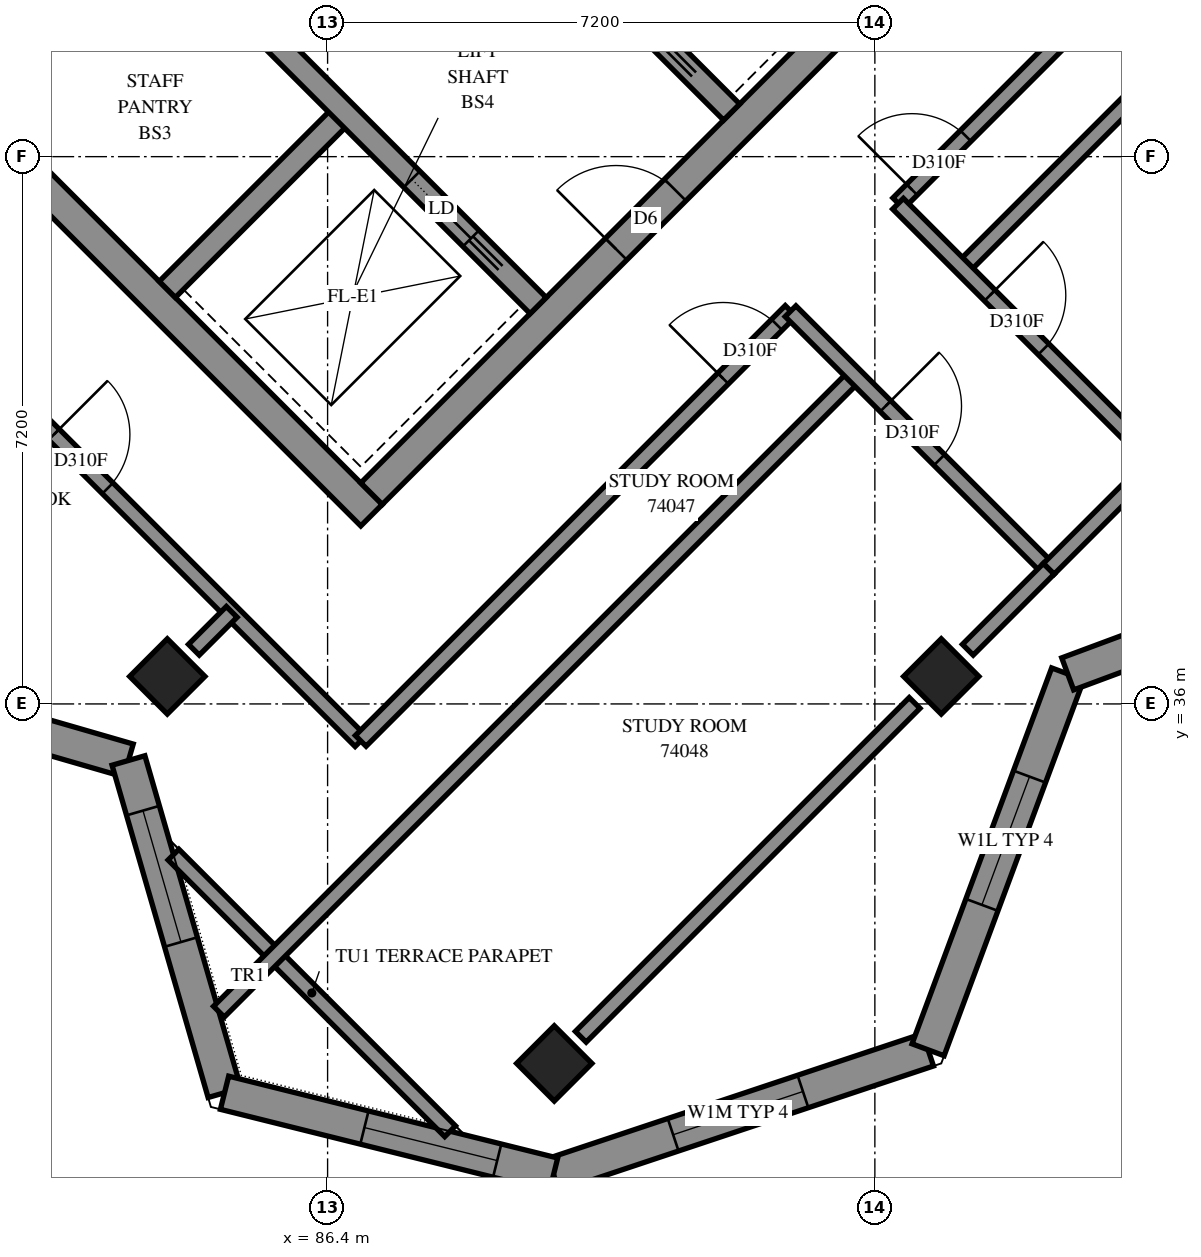
"""IFC4 building model, lengths in metres.
Left out: names, types, materials, properties, quantities, classifications, styles, units other than length and angle.
Written with IfcOpenShell. Run it as: python <this file> out.ifc"""

import sys

from ifc_helpers import new_model, si_unit, direction, frame, frame_2d, origin, origin_2d, place, context, subcontext, project, spatial, polyline, rectangle, outline, extrude, element, fill, save


model = new_model("IFC4")
c1 = context("Model", 3, precision=1e-05, world=origin(), true_north=direction((0.0, 1.0)))
c2 = subcontext(c1, "Body", "Model", "MODEL_VIEW")
j1 = project(units=[si_unit("LENGTHUNIT", "METRE"), si_unit("PLANEANGLEUNIT", "RADIAN")], contexts=[c1])
p1 = place(None, origin())
s1 = spatial("IfcSite", under=j1, at=p1, CompositionType="ELEMENT")
p2 = place(p1, origin())
s2 = spatial("IfcBuilding", under=s1, at=p2, CompositionType="ELEMENT")
p3 = place(p2, frame((0.0, 0.0, 271.0)))
s3 = spatial("IfcBuildingStorey", under=s2, at=p3, CompositionType="ELEMENT", Elevation=271.0)
for number, where, z_axis, x_axis in (
    (1, (84.291, 36.362, 0.0), (0.0, 0.0, 1.0), (0.707, -0.707, 0.0)),
    (2, (94.474, 36.362, 0.0), (0.0, 0.0, 1.0), (0.707, -0.707, 0.0)),
    (3, (89.382, 31.271, 0.0), (0.0, 0.0, 1.0), (0.707, -0.707, 0.0)),
):
    element("IfcColumn", number, at=place(p3, frame(where, z_axis=z_axis, x_axis=x_axis)), inside=s3, PredefinedType="COLUMN", context=c2, shape_type="SweptSolid", body=[
        extrude(rectangle(XDim=0.7, YDim=0.7, at=origin_2d()), origin(), (0.0, 0.0, 1.0), 3.1),
    ])
p4 = place(p3, frame((76.23, 49.231, -0.3), z_axis=(0.0, 0.0, 1.0), x_axis=(0.7071034917, -0.7071100706, 0.0)))
e4 = element("IfcWall", 4, at=p4, inside=s3, PredefinedType="SHEAR", context=c2, shape_type="SweptSolid", body=[
    extrude(rectangle(XDim=15.2, YDim=0.4, at=frame_2d((7.6, 0.0))), origin(), (0.0, 0.0, 1.0), 2.7),
])
p5 = place(p3, frame((86.978, 38.766, -0.3), z_axis=(0.0, 0.0, 1.0), x_axis=(0.7071067812, 0.7071067812, 0.0)))
e5 = element("IfcWall", 5, at=p5, inside=s3, PredefinedType="SHEAR", context=c2, shape_type="SweptSolid", body=[
    extrude(rectangle(XDim=14.4, YDim=0.4, at=frame_2d((7.2, 0.0))), origin(), (0.0, 0.0, 1.0), 2.7),
])
p6 = place(p5, frame((4.55, 0.0, 0.3)))
e6 = element("IfcOpeningElement", 6, at=p6, cuts=e5, PredefinedType="OPENING", context=c2, shape_type="SweptSolid", body=[
    extrude(rectangle(XDim=1.1, YDim=2.1, at=frame_2d((0.55, 1.05))), frame((0.0, 0.21, 0.0), z_axis=(0.0, -1.0, 0.0), x_axis=(1.0, 0.0, 0.0)), (0.0, 0.0, 1.0), 0.42),
])
p7 = place(p5, frame((11.35, 0.0, 0.3)))
e7 = element("IfcOpeningElement", 7, at=p7, cuts=e5, PredefinedType="OPENING", context=c2, shape_type="SweptSolid", body=[
    extrude(rectangle(XDim=1.1, YDim=2.1, at=frame_2d((0.55, 1.05))), frame((0.0, 0.21, 0.0), z_axis=(0.0, -1.0, 0.0), x_axis=(1.0, 0.0, 0.0)), (0.0, 0.0, 1.0), 0.42),
])
for number, where, z_axis, x_axis in (
    (8, (81.746, 43.999, 0.0), (0.0, 0.0, 1.0), (0.707, 0.707, 0.0)),
    (9, (84.291, 41.453, 0.0), (0.0, 0.0, 1.0), (0.707, 0.707, 0.0)),
):
    element("IfcWall", number, at=place(p3, frame(where, z_axis=z_axis, x_axis=x_axis)), inside=s3, PredefinedType="SOLIDWALL", context=c2, shape_type="SweptSolid", body=[
        extrude(rectangle(XDim=3.3, YDim=0.3, at=frame_2d((1.65, 0.0))), origin(), (0.0, 0.0, 1.0), 3.1),
    ])
p8 = place(p3, frame((78.988, 51.423, 0.0), z_axis=(0.0, 0.0, 1.0), x_axis=(0.7071067812, -0.7071067812, 0.0)))
e10 = element("IfcWall", 10, at=p8, inside=s3, PredefinedType="SOLIDWALL", context=c2, shape_type="SweptSolid", body=[
    extrude(rectangle(XDim=14.4, YDim=0.3, at=frame_2d((7.2, 0.0))), origin(), (0.0, 0.0, 1.0), 3.1),
])
p9 = place(p8, frame((1.35, 0.0, 0.0)))
e11 = element("IfcOpeningElement", 11, at=p9, cuts=e10, PredefinedType="OPENING", context=c2, shape_type="SweptSolid", body=[
    extrude(rectangle(XDim=0.9, YDim=2.1, at=frame_2d((0.45, 1.05))), frame((0.0, 0.16, 0.0), z_axis=(0.0, -1.0, 0.0), x_axis=(1.0, 0.0, 0.0)), (0.0, 0.0, 1.0), 0.32),
])
p10 = place(p8, frame((4.95, 0.0, 0.0)))
e12 = element("IfcOpeningElement", 12, at=p10, cuts=e10, PredefinedType="OPENING", context=c2, shape_type="SweptSolid", body=[
    extrude(rectangle(XDim=0.9, YDim=2.1, at=frame_2d((0.45, 1.05))), frame((0.0, 0.16, 0.0), z_axis=(0.0, -1.0, 0.0), x_axis=(1.0, 0.0, 0.0)), (0.0, 0.0, 1.0), 0.32),
])
p11 = place(p8, frame((8.55, 0.0, 0.0)))
e13 = element("IfcOpeningElement", 13, at=p11, cuts=e10, PredefinedType="OPENING", context=c2, shape_type="SweptSolid", body=[
    extrude(rectangle(XDim=0.9, YDim=2.1, at=frame_2d((0.45, 1.05))), frame((0.0, 0.16, 0.0), z_axis=(0.0, -1.0, 0.0), x_axis=(1.0, 0.0, 0.0)), (0.0, 0.0, 1.0), 0.32),
])
p12 = place(p8, frame((12.05, 0.0, 0.0)))
e14 = element("IfcOpeningElement", 14, at=p12, cuts=e10, PredefinedType="OPENING", context=c2, shape_type="SweptSolid", body=[
    extrude(rectangle(XDim=1.1, YDim=2.1, at=frame_2d((0.55, 1.05))), frame((0.0, 0.16, 0.0), z_axis=(0.0, -1.0, 0.0), x_axis=(1.0, 0.0, 0.0)), (0.0, 0.0, 1.0), 0.32),
])
p13 = place(p3, frame((81.534, 53.969, 0.0), z_axis=(0.0, 0.0, 1.0), x_axis=(0.707103309, -0.7071102534, 0.0)))
e15 = element("IfcWall", 15, at=p13, inside=s3, PredefinedType="SOLIDWALL", context=c2, shape_type="SweptSolid", body=[
    extrude(rectangle(XDim=14.4, YDim=0.3, at=frame_2d((7.2, 0.0))), origin(), (0.0, 0.0, 1.0), 3.1),
])
p14 = place(p13, frame((8.55, 0.0, 0.0)))
e16 = element("IfcOpeningElement", 16, at=p14, cuts=e15, PredefinedType="OPENING", context=c2, shape_type="SweptSolid", body=[
    extrude(rectangle(XDim=0.9, YDim=2.1, at=frame_2d((0.45, 1.05))), frame((0.0, 0.16, 0.0), z_axis=(0.0, -1.0, 0.0), x_axis=(1.0, 0.0, 0.0)), (0.0, 0.0, 1.0), 0.32),
])
p15 = place(p13, frame((1.25, 0.0, 0.0)))
e17 = element("IfcOpeningElement", 17, at=p15, cuts=e15, PredefinedType="OPENING", context=c2, shape_type="SweptSolid", body=[
    extrude(rectangle(XDim=1.1, YDim=2.1, at=frame_2d((0.55, 1.05))), frame((0.0, 0.16, 0.0), z_axis=(0.0, -1.0, 0.0), x_axis=(1.0, 0.0, 0.0)), (0.0, 0.0, 1.0), 0.32),
])
p16 = place(p13, frame((4.85, 0.0, 0.0)))
e18 = element("IfcOpeningElement", 18, at=p16, cuts=e15, PredefinedType="OPENING", context=c2, shape_type="SweptSolid", body=[
    extrude(rectangle(XDim=1.1, YDim=2.1, at=frame_2d((0.55, 1.05))), frame((0.0, 0.16, 0.0), z_axis=(0.0, -1.0, 0.0), x_axis=(1.0, 0.0, 0.0)), (0.0, 0.0, 1.0), 0.32),
])
p17 = place(p13, frame((12.05, 0.0, 0.0)))
e19 = element("IfcOpeningElement", 19, at=p17, cuts=e15, PredefinedType="OPENING", context=c2, shape_type="SweptSolid", body=[
    extrude(rectangle(XDim=1.1, YDim=2.1, at=frame_2d((0.55, 1.05))), frame((0.0, 0.16, 0.0), z_axis=(0.0, -1.0, 0.0), x_axis=(1.0, 0.0, 0.0)), (0.0, 0.0, 1.0), 0.32),
])
p18 = place(p3, frame((89.373, 29.808, 0.0), z_axis=(0.0, 0.0, 1.0), x_axis=(0.9486832981, 0.316227766, 0.0)))
e20 = element("IfcWall", 20, at=p18, inside=s3, PredefinedType="SOLIDWALL", context=c2, shape_type="SweptSolid", body=[
    extrude(outline(polyline([(-0.065, -0.225), (5.301, -0.225), (5.086, 0.225), (0.065, 0.225), (-0.065, -0.225)])), origin(), (0.0, 0.0, 1.0), 2.6),
])
p19 = place(p18, frame((1.658, 0.0, 0.7)))
e21 = element("IfcOpeningElement", 21, at=p19, cuts=e20, PredefinedType="OPENING", context=c2, shape_type="SweptSolid", body=[
    extrude(rectangle(XDim=1.8, YDim=1.8, at=frame_2d((0.9, 0.9))), frame((0.0, 0.235, 0.0), z_axis=(0.0, -1.0, 0.0), x_axis=(1.0, 0.0, 0.0)), (0.0, 0.0, 1.0), 0.47),
])
p20 = place(p3, frame((94.3, 31.45, 0.0), z_axis=(0.0, 0.0, 1.0), x_axis=(0.3481927166, 0.9374229739, 0.0)))
e22 = element("IfcWall", 22, at=p20, inside=s3, PredefinedType="SOLIDWALL", context=c2, shape_type="SweptSolid", body=[
    extrude(outline(polyline([(-0.108, -0.225), (5.172, -0.225), (5.379, 0.225), (0.108, 0.225), (-0.108, -0.225)])), origin(), (0.0, 0.0, 1.0), 2.6),
])
p21 = place(p20, frame((2.034, 0.0, 0.6)))
e23 = element("IfcOpeningElement", 23, at=p21, cuts=e22, PredefinedType="OPENING", context=c2, shape_type="SweptSolid", body=[
    extrude(rectangle(XDim=1.8, YDim=1.9, at=frame_2d((0.9, 0.95))), frame((0.0, 0.235, 0.0), z_axis=(0.0, -1.0, 0.0), x_axis=(1.0, 0.0, 0.0)), (0.0, 0.0, 1.0), 0.47),
])
p22 = place(p3, frame((96.137, 36.395, 0.0), z_axis=(0.0, 0.0, 1.0), x_axis=(0.937429161, 0.3481760591, 0.0)))
e24 = element("IfcWall", 24, at=p22, inside=s3, PredefinedType="SOLIDWALL", context=c2, shape_type="SweptSolid", body=[
    extrude(outline(polyline([(0.103, -0.225), (5.383, -0.225), (5.168, 0.225), (-0.103, 0.225), (0.103, -0.225)])), origin(), (0.0, 0.0, 1.0), 3.1),
])
p23 = place(p22, frame((2.151, 0.0, 0.6)))
e25 = element("IfcOpeningElement", 25, at=p23, cuts=e24, PredefinedType="OPENING", context=c2, shape_type="SweptSolid", body=[
    extrude(rectangle(XDim=1.8, YDim=1.9, at=frame_2d((0.9, 0.95))), frame((0.0, 0.235, 0.0), z_axis=(0.0, -1.0, 0.0), x_axis=(1.0, 0.0, 0.0)), (0.0, 0.0, 1.0), 0.47),
])
p24 = place(p3, frame((79.409, 36.52, 0.0), z_axis=(0.0, 0.0, 1.0), x_axis=(0.9606525687, -0.2777528438, 0.0)))
e26 = element("IfcWall", 26, at=p24, inside=s3, PredefinedType="SOLIDWALL", context=c2, shape_type="SweptSolid", body=[
    extrude(outline(polyline([(-0.13, -0.225), (4.426, -0.225), (4.675, 0.225), (0.13, 0.225), (-0.13, -0.225)])), origin(), (0.0, 0.0, 1.0), 3.1),
])
p25 = place(p24, frame((1.03, 0.0, 0.7)))
e27 = element("IfcOpeningElement", 27, at=p25, cuts=e26, PredefinedType="OPENING", context=c2, shape_type="SweptSolid", body=[
    extrude(rectangle(XDim=1.8, YDim=1.8, at=frame_2d((0.9, 0.9))), frame((0.0, 0.235, 0.0), z_axis=(0.0, -1.0, 0.0), x_axis=(1.0, 0.0, 0.0)), (0.0, 0.0, 1.0), 0.47),
])
p26 = place(p3, frame((83.78, 35.256, 0.0), z_axis=(0.0, 0.0, 1.0), x_axis=(0.2777528438, -0.9606525687, 0.0)))
e28 = element("IfcWall", 28, at=p26, inside=s3, PredefinedType="SOLIDWALL", context=c2, shape_type="SweptSolid", body=[
    extrude(outline(polyline([(0.124, -0.225), (4.68, -0.225), (4.421, 0.225), (-0.124, 0.225), (0.124, -0.225)])), origin(), (0.0, 0.0, 1.0), 3.1),
])
p27 = place(p26, frame((0.686, 0.0, 0.7)))
e29 = element("IfcOpeningElement", 29, at=p27, cuts=e28, PredefinedType="OPENING", context=c2, shape_type="SweptSolid", body=[
    extrude(rectangle(XDim=1.8, YDim=1.8, at=frame_2d((0.9, 0.9))), frame((0.0, 0.235, 0.0), z_axis=(0.0, -1.0, 0.0), x_axis=(1.0, 0.0, 0.0)), (0.0, 0.0, 1.0), 0.47),
])
p28 = place(p3, frame((85.044, 30.885, 0.0), z_axis=(0.0, 0.0, 1.0), x_axis=(0.9704174733, -0.2414330705, 0.0)))
e30 = element("IfcWall", 30, at=p28, inside=s3, PredefinedType="SOLIDWALL", context=c2, shape_type="SweptSolid", body=[
    extrude(outline(polyline([(-0.13, -0.225), (4.526, -0.225), (4.396, 0.225), (0.13, 0.225), (-0.13, -0.225)])), origin(), (0.0, 0.0, 1.0), 3.1),
])
p29 = place(p28, frame((1.896, 0.0, 0.7)))
e31 = element("IfcOpeningElement", 31, at=p29, cuts=e30, PredefinedType="OPENING", context=c2, shape_type="SweptSolid", body=[
    extrude(rectangle(XDim=1.8, YDim=1.8, at=frame_2d((0.9, 0.9))), frame((0.0, 0.235, 0.0), z_axis=(0.0, -1.0, 0.0), x_axis=(1.0, 0.0, 0.0)), (0.0, 0.0, 1.0), 0.47),
])
p30 = place(p3, frame((88.012, 30.378, 0.0), z_axis=(0.0, 0.0, 1.0), x_axis=(-0.7071067812, 0.7071067812, 0.0)))
e32 = element("IfcWall", 32, at=p30, inside=s3, PredefinedType="PARAPET", context=c2, shape_type="SweptSolid", body=[
    extrude(outline(polyline([(0.0, -0.1), (5.147, -0.1), (5.147, 0.1), (0.0, 0.1), (0.0, -0.1)])), origin(), (0.0, 0.0, 1.0), 0.25),
])
p31 = place(p3, frame((84.97, 31.951, 0.0), z_axis=(0.0, 0.0, 1.0), x_axis=(0.7071025578, 0.7071110045, 0.0)))
e33 = element("IfcWall", 33, at=p31, inside=s3, PredefinedType="PARTITIONING", context=c2, shape_type="SweptSolid", body=[
    extrude(rectangle(XDim=11.839, YDim=0.2, at=frame_2d((5.92, 0.0))), origin(), (0.0, 0.0, 1.0), 3.1),
])
p32 = place(p3, frame((93.908, 42.586, 0.0), z_axis=(0.0, 0.0, 1.0), x_axis=(0.7071067812, 0.7071067812, 0.0)))
e34 = element("IfcWall", 34, at=p32, inside=s3, PredefinedType="PARTITIONING", context=c2, shape_type="SweptSolid", body=[
    extrude(rectangle(XDim=9.198, YDim=0.2, at=frame_2d((4.599, 0.0))), origin(), (0.0, 0.0, 1.0), 3.1),
])
p33 = place(p32, frame((0.254, 0.0, 0.0)))
e35 = element("IfcOpeningElement", 35, at=p33, cuts=e34, PredefinedType="OPENING", context=c2, shape_type="SweptSolid", body=[
    extrude(rectangle(XDim=1.0, YDim=2.1, at=frame_2d((0.5, 1.05))), frame((0.0, 0.11, 0.0), z_axis=(0.0, -1.0, 0.0), x_axis=(1.0, 0.0, 0.0)), (0.0, 0.0, 1.0), 0.22),
])
p34 = place(p3, frame((80.747, 41.597, 0.0), z_axis=(0.0, 0.0, 1.0), x_axis=(0.7071067812, -0.7071067812, 0.0)))
e36 = element("IfcWall", 36, at=p34, inside=s3, PredefinedType="PARTITIONING", context=c2, shape_type="SweptSolid", body=[
    extrude(rectangle(XDim=8.607, YDim=0.2, at=frame_2d((4.303, 0.0))), origin(), (0.0, 0.0, 1.0), 3.1),
])
p35 = place(p34, frame((2.903, 0.0, 0.0)))
e37 = element("IfcOpeningElement", 37, at=p35, cuts=e36, PredefinedType="OPENING", context=c2, shape_type="SweptSolid", body=[
    extrude(rectangle(XDim=1.0, YDim=2.1, at=frame_2d((0.5, 1.05))), frame((0.0, 0.11, 0.0), z_axis=(0.0, -1.0, 0.0), x_axis=(1.0, 0.0, 0.0)), (0.0, 0.0, 1.0), 0.22),
])
p36 = place(p3, frame((86.836, 35.514, 0.0), z_axis=(0.0, 0.0, 1.0), x_axis=(0.7071067812, 0.7071067812, 0.0)))
e38 = element("IfcWall", 38, at=p36, inside=s3, PredefinedType="PARTITIONING", context=c2, shape_type="SweptSolid", body=[
    extrude(rectangle(XDim=7.999, YDim=0.2, at=frame_2d((3.999, 0.0))), origin(), (0.0, 0.0, 1.0), 3.1),
])
p37 = place(p36, frame((6.742, 0.0, 0.0)))
e39 = element("IfcOpeningElement", 39, at=p37, cuts=e38, PredefinedType="OPENING", context=c2, shape_type="SweptSolid", body=[
    extrude(rectangle(XDim=1.0, YDim=2.1, at=frame_2d((0.5, 1.05))), frame((0.0, 0.11, 0.0), z_axis=(0.0, -1.0, 0.0), x_axis=(1.0, 0.0, 0.0)), (0.0, 0.0, 1.0), 0.22),
])
p38 = place(p3, frame((94.755, 41.737, 0.0), z_axis=(0.0, 0.0, 1.0), x_axis=(0.7071146549, 0.7070989073, 0.0)))
e40 = element("IfcWall", 40, at=p38, inside=s3, PredefinedType="PARTITIONING", context=c2, shape_type="SweptSolid", body=[
    extrude(rectangle(XDim=6.35, YDim=0.2, at=frame_2d((3.175, 0.0))), origin(), (0.0, 0.0, 1.0), 3.1),
])
p39 = place(p3, frame((89.731, 31.621, 0.0), z_axis=(0.0, 0.0, 1.0), x_axis=(0.7071067812, 0.7071067812, 0.0)))
e41 = element("IfcWall", 41, at=p39, inside=s3, PredefinedType="PARTITIONING", context=c2, shape_type="SweptSolid", body=[
    extrude(rectangle(XDim=6.211, YDim=0.2, at=frame_2d((3.106, 0.0))), origin(), (0.0, 0.0, 1.0), 2.6),
])
p40 = place(p3, frame((93.905, 42.581, 0.0), z_axis=(0.0, 0.0, 1.0), x_axis=(0.7071067812, -0.7071067812, 0.0)))
e42 = element("IfcWall", 42, at=p40, inside=s3, PredefinedType="PARTITIONING", context=c2, shape_type="SweptSolid", body=[
    extrude(rectangle(XDim=4.8, YDim=0.2, at=frame_2d((2.4, 0.0))), origin(), (0.0, 0.0, 1.0), 3.1),
])
p41 = place(p40, frame((1.707, 0.0, 0.0)))
e43 = element("IfcOpeningElement", 43, at=p41, cuts=e42, PredefinedType="OPENING", context=c2, shape_type="SweptSolid", body=[
    extrude(rectangle(XDim=1.0, YDim=2.1, at=frame_2d((0.5, 1.05))), frame((0.0, 0.11, 0.0), z_axis=(0.0, -1.0, 0.0), x_axis=(1.0, 0.0, 0.0)), (0.0, 0.0, 1.0), 0.22),
])
p42 = place(p3, frame((92.491, 41.167, 0.0), z_axis=(0.0, 0.0, 1.0), x_axis=(0.7071067812, -0.7071067812, 0.0)))
e44 = element("IfcWall", 44, at=p42, inside=s3, PredefinedType="PARTITIONING", context=c2, shape_type="SweptSolid", body=[
    extrude(rectangle(XDim=4.8, YDim=0.2, at=frame_2d((2.4, 0.0))), origin(), (0.0, 0.0, 1.0), 3.1),
])
p43 = place(p42, frame((1.767, 0.0, 0.0)))
e45 = element("IfcOpeningElement", 45, at=p43, cuts=e44, PredefinedType="OPENING", context=c2, shape_type="SweptSolid", body=[
    extrude(rectangle(XDim=1.0, YDim=2.1, at=frame_2d((0.5, 1.05))), frame((0.0, 0.11, 0.0), z_axis=(0.0, -1.0, 0.0), x_axis=(1.0, 0.0, 0.0)), (0.0, 0.0, 1.0), 0.22),
])
p44 = place(p3, frame((95.887, 37.777, 0.0), z_axis=(0.0, 0.0, 1.0), x_axis=(0.7071067812, 0.7071067812, 0.0)))
e46 = element("IfcWall", 46, at=p44, inside=s3, PredefinedType="PARTITIONING", context=c2, shape_type="SweptSolid", body=[
    extrude(rectangle(XDim=2.0, YDim=0.2, at=frame_2d((1.0, 0.0))), origin(), (0.0, 0.0, 1.0), 2.6),
])
p45 = place(p3, frame((94.823, 36.713, 0.0), z_axis=(0.0, 0.0, 1.0), x_axis=(0.7071067812, 0.7071067812, 0.0)))
e47 = element("IfcWall", 47, at=p45, inside=s3, PredefinedType="PARTITIONING", context=c2, shape_type="SweptSolid", body=[
    extrude(rectangle(XDim=1.505, YDim=0.2, at=frame_2d((0.752, 0.0))), origin(), (0.0, 0.0, 1.0), 2.6),
])
p46 = place(p3, frame((84.641, 36.713, 0.0), z_axis=(0.0, 0.0, 1.0), x_axis=(0.7071067812, 0.7071067812, 0.0)))
e48 = element("IfcWall", 48, at=p46, inside=s3, PredefinedType="PARTITIONING", context=c2, shape_type="SweptSolid", body=[
    extrude(rectangle(XDim=0.704, YDim=0.2, at=frame_2d((0.352, 0.0))), origin(), (0.0, 0.0, 1.0), 3.1),
])
p47 = place(p19, origin())
e49 = element("IfcWindow", 49, at=p47, inside=s3, PartitioningType="SINGLE_PANEL", PredefinedType="WINDOW", context=c2, shape_type="SweptSolid", body=[
    extrude(rectangle(XDim=1.8, YDim=1.8, at=frame_2d((0.9, 0.9))), frame((0.0, 0.205, 0.0), z_axis=(0.0, -1.0, 0.0), x_axis=(1.0, 0.0, 0.0)), (0.0, 0.0, 1.0), 0.06),
])
fill(e21, e49)
p48 = place(p21, origin())
e50 = element("IfcWindow", 50, at=p48, inside=s3, PartitioningType="SINGLE_PANEL", PredefinedType="WINDOW", context=c2, shape_type="SweptSolid", body=[
    extrude(rectangle(XDim=1.8, YDim=1.9, at=frame_2d((0.9, 0.95))), frame((0.0, 0.205, 0.0), z_axis=(0.0, -1.0, 0.0), x_axis=(1.0, 0.0, 0.0)), (0.0, 0.0, 1.0), 0.06),
])
fill(e23, e50)
p49 = place(p27, origin())
e51 = element("IfcWindow", 51, at=p49, inside=s3, PartitioningType="SINGLE_PANEL", PredefinedType="WINDOW", context=c2, shape_type="SweptSolid", body=[
    extrude(rectangle(XDim=1.8, YDim=1.8, at=frame_2d((0.9, 0.9))), frame((0.0, 0.135, 0.0), z_axis=(0.0, -1.0, 0.0), x_axis=(1.0, 0.0, 0.0)), (0.0, 0.0, 1.0), 0.06),
])
fill(e29, e51)
p50 = place(p29, origin())
e52 = element("IfcWindow", 52, at=p50, inside=s3, PartitioningType="SINGLE_PANEL", PredefinedType="WINDOW", context=c2, shape_type="SweptSolid", body=[
    extrude(rectangle(XDim=1.8, YDim=1.8, at=frame_2d((0.9, 0.9))), frame((0.0, 0.135, 0.0), z_axis=(0.0, -1.0, 0.0), x_axis=(1.0, 0.0, 0.0)), (0.0, 0.0, 1.0), 0.06),
])
fill(e31, e52)
p51 = place(p6, origin())
e53 = element("IfcDoor", 53, at=p51, inside=s3, OperationType="DOUBLE_DOOR_SINGLE_SWING", PredefinedType="DOOR", context=c2, shape_type="SweptSolid", body=[
    extrude(rectangle(XDim=1.1, YDim=2.1, at=frame_2d((0.55, 1.05))), frame((0.0, 0.025, 0.0), z_axis=(0.0, -1.0, 0.0), x_axis=(1.0, 0.0, 0.0)), (0.0, 0.0, 1.0), 0.05),
])
fill(e6, e53)
p52 = place(p12, origin())
e54 = element("IfcDoor", 54, at=p52, inside=s3, OperationType="SLIDING_TO_RIGHT", PredefinedType="DOOR", context=c2, shape_type="SweptSolid", body=[
    extrude(rectangle(XDim=1.1, YDim=2.1, at=frame_2d((0.55, 1.05))), frame((0.0, 0.025, 0.0), z_axis=(0.0, -1.0, 0.0), x_axis=(1.0, 0.0, 0.0)), (0.0, 0.0, 1.0), 0.05),
])
fill(e14, e54)
p53 = place(p33, origin())
e55 = element("IfcDoor", 55, at=p53, inside=s3, OperationType="SINGLE_SWING_RIGHT", PredefinedType="DOOR", context=c2, shape_type="SweptSolid", body=[
    extrude(rectangle(XDim=1.0, YDim=2.1, at=frame_2d((0.5, 1.05))), frame((0.0, 0.025, 0.0), z_axis=(0.0, -1.0, 0.0), x_axis=(1.0, 0.0, 0.0)), (0.0, 0.0, 1.0), 0.05),
])
fill(e35, e55)
p54 = place(p35, origin())
e56 = element("IfcDoor", 56, at=p54, inside=s3, OperationType="SINGLE_SWING_RIGHT", PredefinedType="DOOR", context=c2, shape_type="SweptSolid", body=[
    extrude(rectangle(XDim=1.0, YDim=2.1, at=frame_2d((0.5, 1.05))), frame((0.0, 0.025, 0.0), z_axis=(0.0, -1.0, 0.0), x_axis=(1.0, 0.0, 0.0)), (0.0, 0.0, 1.0), 0.05),
])
fill(e37, e56)
p55 = place(p37, origin())
e57 = element("IfcDoor", 57, at=p55, inside=s3, OperationType="SINGLE_SWING_RIGHT", PredefinedType="DOOR", context=c2, shape_type="SweptSolid", body=[
    extrude(rectangle(XDim=1.0, YDim=2.1, at=frame_2d((0.5, 1.05))), frame((0.0, 0.025, 0.0), z_axis=(0.0, -1.0, 0.0), x_axis=(1.0, 0.0, 0.0)), (0.0, 0.0, 1.0), 0.05),
])
fill(e39, e57)
p56 = place(p43, origin())
e58 = element("IfcDoor", 58, at=p56, inside=s3, OperationType="SINGLE_SWING_LEFT", PredefinedType="DOOR", context=c2, shape_type="SweptSolid", body=[
    extrude(rectangle(XDim=1.0, YDim=2.1, at=frame_2d((0.5, 1.05))), frame((0.0, 0.025, 0.0), z_axis=(0.0, -1.0, 0.0), x_axis=(1.0, 0.0, 0.0)), (0.0, 0.0, 1.0), 0.05),
])
fill(e45, e58)
p57 = place(p41, origin())
e59 = element("IfcDoor", 59, at=p57, inside=s3, OperationType="SINGLE_SWING_RIGHT", PredefinedType="DOOR", context=c2, shape_type="SweptSolid", body=[
    extrude(rectangle(XDim=1.0, YDim=2.1, at=frame_2d((0.5, 1.05))), frame((0.0, 0.025, 0.0), z_axis=(0.0, -1.0, 0.0), x_axis=(1.0, 0.0, 0.0)), (0.0, 0.0, 1.0), 0.05),
])
fill(e43, e59)
save(model, sys.argv[1])
